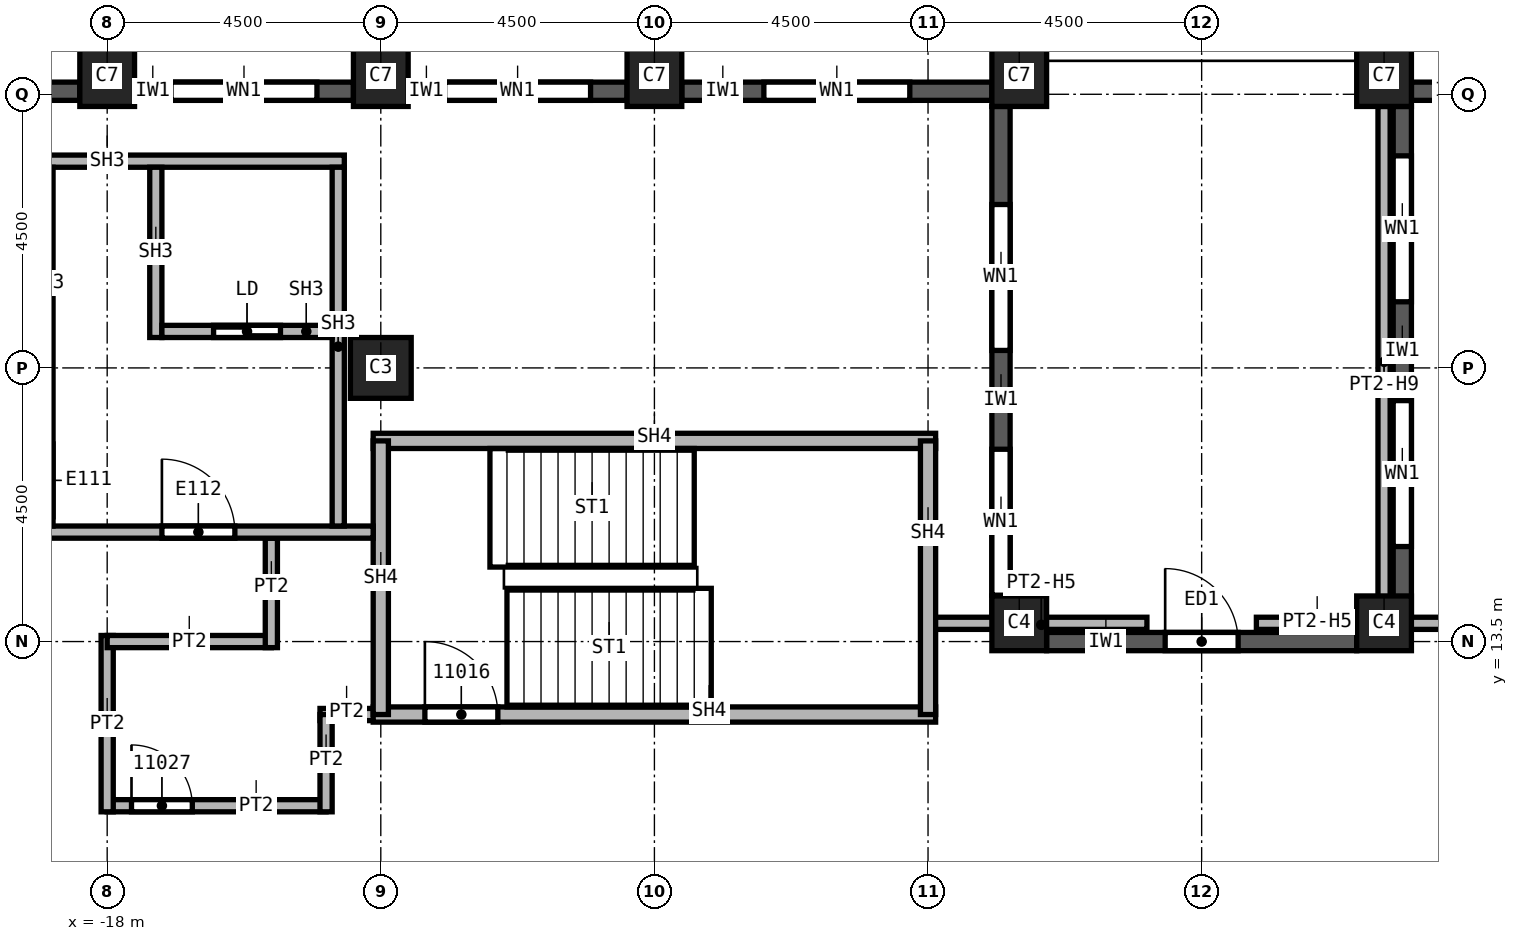
"""IFC4 building model, lengths in metres.
Left out: names, types, materials, properties, quantities, classifications, styles, units other than length and angle.
Written with IfcOpenShell. Run it as: python <this file> out.ifc"""

import sys

from ifc_helpers import new_model, si_unit, direction, frame, frame_2d, origin, origin_2d, place, context, subcontext, project, spatial, rectangle, extrude, element, fill, save


model = new_model("IFC4")
c1 = context("Model", 3, precision=1e-05, world=origin(), true_north=direction((0.0, 1.0)))
c2 = subcontext(c1, "Body", "Model", "MODEL_VIEW")
j1 = project(units=[si_unit("LENGTHUNIT", "METRE"), si_unit("PLANEANGLEUNIT", "RADIAN")], contexts=[c1])
p1 = place(None, origin())
s1 = spatial("IfcSite", under=j1, at=p1, CompositionType="ELEMENT")
p2 = place(p1, origin())
s2 = spatial("IfcBuilding", under=s1, at=p2, CompositionType="ELEMENT")
p3 = place(p2, frame((0.0, 0.0, 184.0)))
s3 = spatial("IfcBuildingStorey", under=s2, at=p3, CompositionType="ELEMENT", Elevation=184.0)
p4 = place(p3, frame((-13.5, 18.0, 0.0), z_axis=(0.0, 0.0, 1.0), x_axis=(1.0, 0.0, 0.0)))
e1 = element("IfcColumn", 1, at=p4, inside=s3, PredefinedType="COLUMN", context=c2, shape_type="SweptSolid", body=[
    extrude(rectangle(XDim=1.0, YDim=1.0, at=origin_2d()), origin(), (0.0, 0.0, 1.0), 3.72),
])
for number, where, z_axis, x_axis in (
    (2, (3.0, 22.8, 0.0), (0.0, 0.0, 1.0), (1.0, 0.0, 0.0)),
    (3, (-3.0, 22.8, 0.0), (0.0, 0.0, 1.0), (1.0, 0.0, 0.0)),
    (4, (-9.0, 22.8, 0.0), (0.0, 0.0, 1.0), (1.0, 0.0, 0.0)),
    (5, (-13.5, 22.8, 0.0), (0.0, 0.0, 1.0), (1.0, 0.0, 0.0)),
    (6, (-18.0, 22.8, 0.0), (0.0, 0.0, 1.0), (1.0, 0.0, 0.0)),
):
    element("IfcColumn", number, at=place(p3, frame(where, z_axis=z_axis, x_axis=x_axis)), inside=s3, PredefinedType="COLUMN", context=c2, shape_type="SweptSolid", body=[
        extrude(rectangle(XDim=0.9, YDim=1.0, at=origin_2d()), origin(), (0.0, 0.0, 1.0), 3.72),
    ])
for number, where, z_axis, x_axis in (
    (7, (3.0, 13.8, 0.0), (0.0, 0.0, 1.0), (1.0, 0.0, 0.0)),
    (8, (-3.0, 13.8, 0.0), (0.0, 0.0, 1.0), (1.0, 0.0, 0.0)),
):
    element("IfcColumn", number, at=place(p3, frame(where, z_axis=z_axis, x_axis=x_axis)), inside=s3, PredefinedType="COLUMN", context=c2, shape_type="SweptSolid", body=[
        extrude(rectangle(XDim=0.9, YDim=0.9, at=origin_2d()), origin(), (0.0, 0.0, 1.0), 3.72),
    ])
p5 = place(p3, frame((8.55, 22.55, 0.0), z_axis=(0.0, 0.0, 1.0), x_axis=(-1.0, 0.0, 0.0)))
e9 = element("IfcWall", 9, at=p5, inside=s3, PredefinedType="SOLIDWALL", context=c2, shape_type="SweptSolid", body=[
    extrude(rectangle(XDim=5.1, YDim=0.3, at=frame_2d((2.55, 0.0))), origin(), (0.0, 0.0, 1.0), 3.12),
])
p6 = place(p5, frame((1.35, 0.0, 0.8)))
e10 = element("IfcOpeningElement", 10, at=p6, cuts=e9, PredefinedType="OPENING", context=c2, shape_type="SweptSolid", body=[
    extrude(rectangle(XDim=2.4, YDim=1.95, at=frame_2d((1.2, 0.975))), frame((0.0, 0.15, 0.0), z_axis=(0.0, -1.0, 0.0), x_axis=(1.0, 0.0, 0.0)), (0.0, 0.0, 1.0), 0.3),
])
p7 = place(p3, frame((3.3, 22.3, 0.0), z_axis=(0.0, 0.0, 1.0), x_axis=(0.0, -1.0, 0.0)))
e11 = element("IfcWall", 11, at=p7, inside=s3, PredefinedType="SOLIDWALL", context=c2, shape_type="SweptSolid", body=[
    extrude(rectangle(XDim=8.45, YDim=0.3, at=frame_2d((4.225, 0.0))), origin(), (0.0, 0.0, 1.0), 3.12),
])
p8 = place(p7, frame((0.812, 0.0, 0.8)))
e12 = element("IfcOpeningElement", 12, at=p8, cuts=e11, PredefinedType="OPENING", context=c2, shape_type="SweptSolid", body=[
    extrude(rectangle(XDim=2.4, YDim=1.95, at=frame_2d((1.2, 0.975))), frame((0.0, 0.15, 0.0), z_axis=(0.0, -1.0, 0.0), x_axis=(1.0, 0.0, 0.0)), (0.0, 0.0, 1.0), 0.3),
])
p9 = place(p7, frame((4.837, 0.0, 0.8)))
e13 = element("IfcOpeningElement", 13, at=p9, cuts=e11, PredefinedType="OPENING", context=c2, shape_type="SweptSolid", body=[
    extrude(rectangle(XDim=2.4, YDim=1.95, at=frame_2d((1.2, 0.975))), frame((0.0, 0.15, 0.0), z_axis=(0.0, -1.0, 0.0), x_axis=(1.0, 0.0, 0.0)), (0.0, 0.0, 1.0), 0.3),
])
p10 = place(p3, frame((-2.55, 13.5, 0.0), z_axis=(0.0, 0.0, 1.0), x_axis=(1.0, 0.0, 0.0)))
e14 = element("IfcWall", 14, at=p10, inside=s3, PredefinedType="SOLIDWALL", context=c2, shape_type="SweptSolid", body=[
    extrude(rectangle(XDim=5.1, YDim=0.3, at=frame_2d((2.55, 0.0))), origin(), (0.0, 0.0, 1.0), 3.12),
])
p11 = place(p10, frame((1.95, 0.0, 0.0)))
e15 = element("IfcOpeningElement", 15, at=p11, cuts=e14, PredefinedType="OPENING", context=c2, shape_type="SweptSolid", body=[
    extrude(rectangle(XDim=1.2, YDim=2.4, at=frame_2d((0.6, 1.2))), frame((0.0, 0.15, 0.0), z_axis=(0.0, -1.0, 0.0), x_axis=(1.0, 0.0, 0.0)), (0.0, 0.0, 1.0), 0.3),
])
p12 = place(p3, frame((-3.3, 13.85, 0.0), z_axis=(0.0, 0.0, 1.0), x_axis=(0.0, 1.0, 0.0)))
e16 = element("IfcWall", 16, at=p12, inside=s3, PredefinedType="SOLIDWALL", context=c2, shape_type="SweptSolid", body=[
    extrude(rectangle(XDim=8.45, YDim=0.3, at=frame_2d((4.225, 0.0))), origin(), (0.0, 0.0, 1.0), 3.12),
])
p13 = place(p12, frame((0.413, 0.0, 0.8)))
e17 = element("IfcOpeningElement", 17, at=p13, cuts=e16, PredefinedType="OPENING", context=c2, shape_type="SweptSolid", body=[
    extrude(rectangle(XDim=2.4, YDim=1.95, at=frame_2d((1.2, 0.975))), frame((0.0, 0.15, 0.0), z_axis=(0.0, -1.0, 0.0), x_axis=(1.0, 0.0, 0.0)), (0.0, 0.0, 1.0), 0.3),
])
p14 = place(p12, frame((4.438, 0.0, 0.8)))
e18 = element("IfcOpeningElement", 18, at=p14, cuts=e16, PredefinedType="OPENING", context=c2, shape_type="SweptSolid", body=[
    extrude(rectangle(XDim=2.4, YDim=1.95, at=frame_2d((1.2, 0.975))), frame((0.0, 0.15, 0.0), z_axis=(0.0, -1.0, 0.0), x_axis=(1.0, 0.0, 0.0)), (0.0, 0.0, 1.0), 0.3),
])
p15 = place(p3, frame((-3.45, 22.55, 0.0), z_axis=(0.0, 0.0, 1.0), x_axis=(-1.0, 0.0, 0.0)))
e19 = element("IfcWall", 19, at=p15, inside=s3, PredefinedType="SOLIDWALL", context=c2, shape_type="SweptSolid", body=[
    extrude(rectangle(XDim=5.1, YDim=0.3, at=frame_2d((2.55, 0.0))), origin(), (0.0, 0.0, 1.0), 3.12),
])
p16 = place(p15, frame((1.35, 0.0, 0.8)))
e20 = element("IfcOpeningElement", 20, at=p16, cuts=e19, PredefinedType="OPENING", context=c2, shape_type="SweptSolid", body=[
    extrude(rectangle(XDim=2.4, YDim=1.95, at=frame_2d((1.2, 0.975))), frame((0.0, 0.15, 0.0), z_axis=(0.0, -1.0, 0.0), x_axis=(1.0, 0.0, 0.0)), (0.0, 0.0, 1.0), 0.3),
])
p17 = place(p3, frame((-9.45, 22.55, 0.0), z_axis=(0.0, 0.0, 1.0), x_axis=(-1.0, 0.0, 0.0)))
e21 = element("IfcWall", 21, at=p17, inside=s3, PredefinedType="SOLIDWALL", context=c2, shape_type="SweptSolid", body=[
    extrude(rectangle(XDim=3.6, YDim=0.3, at=frame_2d((1.8, 0.0))), origin(), (0.0, 0.0, 1.0), 3.12),
])
p18 = place(p17, frame((0.6, 0.0, 0.8)))
e22 = element("IfcOpeningElement", 22, at=p18, cuts=e21, PredefinedType="OPENING", context=c2, shape_type="SweptSolid", body=[
    extrude(rectangle(XDim=2.4, YDim=1.95, at=frame_2d((1.2, 0.975))), frame((0.0, 0.15, 0.0), z_axis=(0.0, -1.0, 0.0), x_axis=(1.0, 0.0, 0.0)), (0.0, 0.0, 1.0), 0.3),
])
p19 = place(p3, frame((-13.95, 22.55, 0.0), z_axis=(0.0, 0.0, 1.0), x_axis=(-1.0, 0.0, 0.0)))
e23 = element("IfcWall", 23, at=p19, inside=s3, PredefinedType="SOLIDWALL", context=c2, shape_type="SweptSolid", body=[
    extrude(rectangle(XDim=3.6, YDim=0.3, at=frame_2d((1.8, 0.0))), origin(), (0.0, 0.0, 1.0), 3.12),
])
p20 = place(p19, frame((0.6, 0.0, 0.8)))
e24 = element("IfcOpeningElement", 24, at=p20, cuts=e23, PredefinedType="OPENING", context=c2, shape_type="SweptSolid", body=[
    extrude(rectangle(XDim=2.4, YDim=1.95, at=frame_2d((1.2, 0.975))), frame((0.0, 0.15, 0.0), z_axis=(0.0, -1.0, 0.0), x_axis=(1.0, 0.0, 0.0)), (0.0, 0.0, 1.0), 0.3),
])
p21 = place(p3, frame((-18.45, 22.55, 0.0), z_axis=(0.0, 0.0, 1.0), x_axis=(-1.0, 0.0, 0.0)))
e25 = element("IfcWall", 25, at=p21, inside=s3, PredefinedType="SOLIDWALL", context=c2, shape_type="SweptSolid", body=[
    extrude(rectangle(XDim=3.6, YDim=0.3, at=frame_2d((1.8, 0.0))), origin(), (0.0, 0.0, 1.0), 3.12),
])
p22 = place(p21, frame((0.6, 0.0, 0.8)))
e26 = element("IfcOpeningElement", 26, at=p22, cuts=e25, PredefinedType="OPENING", context=c2, shape_type="SweptSolid", body=[
    extrude(rectangle(XDim=2.4, YDim=1.95, at=frame_2d((1.2, 0.975))), frame((0.0, 0.15, 0.0), z_axis=(0.0, -1.0, 0.0), x_axis=(1.0, 0.0, 0.0)), (0.0, 0.0, 1.0), 0.3),
])
p23 = place(p3, frame((-18.0, 10.8, 0.0), z_axis=(0.0, 0.0, 1.0), x_axis=(1.0, 0.0, 0.0)))
e27 = element("IfcWall", 27, at=p23, inside=s3, PredefinedType="PARTITIONING", context=c2, shape_type="SweptSolid", body=[
    extrude(rectangle(XDim=3.6, YDim=0.2, at=frame_2d((1.8, 0.0))), origin(), (0.0, 0.0, 1.0), 3.72),
])
p24 = place(p23, frame((0.4, 0.0, 0.0)))
e28 = element("IfcOpeningElement", 28, at=p24, cuts=e27, PredefinedType="OPENING", context=c2, shape_type="SweptSolid", body=[
    extrude(rectangle(XDim=1.0, YDim=2.1, at=frame_2d((0.5, 1.05))), frame((0.0, 0.1, 0.0), z_axis=(0.0, -1.0, 0.0), x_axis=(1.0, 0.0, 0.0)), (0.0, 0.0, 1.0), 0.2),
])
p25 = place(p3, frame((-18.0, 13.6, 0.0), z_axis=(0.0, 0.0, 1.0), x_axis=(0.0, -1.0, 0.0)))
e29 = element("IfcWall", 29, at=p25, inside=s3, PredefinedType="PARTITIONING", context=c2, shape_type="SweptSolid", body=[
    extrude(rectangle(XDim=2.9, YDim=0.2, at=frame_2d((1.45, 0.0))), origin(), (0.0, 0.0, 1.0), 3.72),
])
p26 = place(p3, frame((-15.3, 13.5, 0.0), z_axis=(0.0, 0.0, 1.0), x_axis=(-1.0, 0.0, 0.0)))
e30 = element("IfcWall", 30, at=p26, inside=s3, PredefinedType="PARTITIONING", context=c2, shape_type="SweptSolid", body=[
    extrude(rectangle(XDim=2.7, YDim=0.2, at=frame_2d((1.35, 0.0))), origin(), (0.0, 0.0, 1.0), 3.72),
])
p27 = place(p3, frame((-15.3, 15.2, 0.0), z_axis=(0.0, 0.0, 1.0), x_axis=(0.0, -1.0, 0.0)))
e31 = element("IfcWall", 31, at=p27, inside=s3, PredefinedType="PARTITIONING", context=c2, shape_type="SweptSolid", body=[
    extrude(rectangle(XDim=1.8, YDim=0.2, at=frame_2d((0.9, 0.0))), origin(), (0.0, 0.0, 1.0), 3.72),
])
p28 = place(p3, frame((-14.5, 12.3, 0.0), z_axis=(0.0, 0.0, 1.0), x_axis=(1.0, 0.0, 0.0)))
e32 = element("IfcWall", 32, at=p28, inside=s3, PredefinedType="PARTITIONING", context=c2, shape_type="SweptSolid", body=[
    extrude(rectangle(XDim=1.125, YDim=0.2, at=frame_2d((0.562, 0.0))), origin(), (0.0, 0.0, 1.0), 3.72),
])
p29 = place(p3, frame((-14.4, 10.7, 0.0), z_axis=(0.0, 0.0, 1.0), x_axis=(0.0, 1.0, 0.0)))
e33 = element("IfcWall", 33, at=p29, inside=s3, PredefinedType="PARTITIONING", context=c2, shape_type="SweptSolid", body=[
    extrude(rectangle(XDim=1.6, YDim=0.2, at=frame_2d((0.8, 0.0))), origin(), (0.0, 0.0, 1.0), 3.72),
])
for number, where, z_axis, x_axis in (
    (34, (-4.5, 13.8, 0.0), (0.0, 0.0, 1.0), (1.0, 0.0, 0.0)),
    (35, (0.9, 13.8, 0.0), (0.0, 0.0, 1.0), (1.0, 0.0, 0.0)),
):
    element("IfcWall", number, at=place(p3, frame(where, z_axis=z_axis, x_axis=x_axis)), inside=s3, PredefinedType="PARTITIONING", context=c2, shape_type="SweptSolid", body=[
        extrude(rectangle(XDim=3.6, YDim=0.2, at=frame_2d((1.8, 0.0))), origin(), (0.0, 0.0, 1.0), 3.113),
    ])
p30 = place(p3, frame((3.0, 22.3, 0.0), z_axis=(0.0, 0.0, 1.0), x_axis=(0.0, -1.0, 0.0)))
e36 = element("IfcWall", 36, at=p30, inside=s3, PredefinedType="PARTITIONING", context=c2, shape_type="SweptSolid", body=[
    extrude(rectangle(XDim=8.5, YDim=0.2, at=frame_2d((4.25, 0.0))), origin(), (0.0, 0.0, 1.0), 2.874),
])
p31 = place(p3, frame((-13.625, 12.3, 0.0), z_axis=(0.0, 0.0, 1.0), x_axis=(1.0, 0.0, 0.0)))
e37 = element("IfcWall", 37, at=p31, inside=s3, PredefinedType="SOLIDWALL", context=c2, shape_type="SweptSolid", body=[
    extrude(rectangle(XDim=9.25, YDim=0.25, at=frame_2d((4.625, 0.0))), origin(), (0.0, 0.0, 1.0), 3.72),
])
p32 = place(p31, frame((0.85, 0.0, 0.0)))
e38 = element("IfcOpeningElement", 38, at=p32, cuts=e37, PredefinedType="OPENING", context=c2, shape_type="SweptSolid", body=[
    extrude(rectangle(XDim=1.2, YDim=2.1, at=frame_2d((0.6, 1.05))), frame((0.0, 0.125, 0.0), z_axis=(0.0, -1.0, 0.0), x_axis=(1.0, 0.0, 0.0)), (0.0, 0.0, 1.0), 0.25),
])
p33 = place(p3, frame((-13.625, 16.8, 0.0), z_axis=(0.0, 0.0, 1.0), x_axis=(1.0, 0.0, 0.0)))
e39 = element("IfcWall", 39, at=p33, inside=s3, PredefinedType="SOLIDWALL", context=c2, shape_type="SweptSolid", body=[
    extrude(rectangle(XDim=9.25, YDim=0.25, at=frame_2d((4.625, 0.0))), origin(), (0.0, 0.0, 1.0), 3.72),
])
for number, where, z_axis, x_axis in (
    (40, (-13.5, 12.3, 0.0), (0.0, 0.0, 1.0), (0.0, 1.0, 0.0)),
    (41, (-4.5, 16.8, 0.0), (0.0, 0.0, 1.0), (0.0, -1.0, 0.0)),
):
    element("IfcWall", number, at=place(p3, frame(where, z_axis=z_axis, x_axis=x_axis)), inside=s3, PredefinedType="SOLIDWALL", context=c2, shape_type="SweptSolid", body=[
        extrude(rectangle(XDim=4.5, YDim=0.25, at=frame_2d((2.25, 0.0))), origin(), (0.0, 0.0, 1.0), 3.72),
    ])
p34 = place(p3, frame((-21.9, 15.3, 0.0), z_axis=(0.0, 0.0, 1.0), x_axis=(1.0, 0.0, 0.0)))
e42 = element("IfcWall", 42, at=p34, inside=s3, PredefinedType="SOLIDWALL", context=c2, shape_type="SweptSolid", body=[
    extrude(rectangle(XDim=8.275, YDim=0.2, at=frame_2d((4.137, 0.0))), origin(), (0.0, 0.0, 1.0), 3.72),
])
p35 = place(p34, frame((4.8, 0.0, 0.0)))
e43 = element("IfcOpeningElement", 43, at=p35, cuts=e42, PredefinedType="OPENING", context=c2, shape_type="SweptSolid", body=[
    extrude(rectangle(XDim=1.2, YDim=2.1, at=frame_2d((0.6, 1.05))), frame((0.0, 0.1, 0.0), z_axis=(0.0, -1.0, 0.0), x_axis=(1.0, 0.0, 0.0)), (0.0, 0.0, 1.0), 0.2),
])
p36 = place(p3, frame((-21.9, 21.4, 0.0), z_axis=(0.0, 0.0, 1.0), x_axis=(1.0, 0.0, 0.0)))
e44 = element("IfcWall", 44, at=p36, inside=s3, PredefinedType="SOLIDWALL", context=c2, shape_type="SweptSolid", body=[
    extrude(rectangle(XDim=7.8, YDim=0.2, at=frame_2d((3.9, 0.0))), origin(), (0.0, 0.0, 1.0), 3.72),
])
p37 = place(p3, frame((-14.2, 15.4, 0.0), z_axis=(0.0, 0.0, 1.0), x_axis=(0.0, 1.0, 0.0)))
e45 = element("IfcWall", 45, at=p37, inside=s3, PredefinedType="SOLIDWALL", context=c2, shape_type="SweptSolid", body=[
    extrude(rectangle(XDim=5.9, YDim=0.2, at=frame_2d((2.95, 0.0))), origin(), (0.0, 0.0, 1.0), 3.72),
])
p38 = place(p3, frame((-18.99, 15.4, 0.0), z_axis=(0.0, 0.0, 1.0), x_axis=(0.0, 1.0, 0.0)))
e46 = element("IfcWall", 46, at=p38, inside=s3, PredefinedType="SOLIDWALL", context=c2, shape_type="SweptSolid", body=[
    extrude(rectangle(XDim=5.9, YDim=0.2, at=frame_2d((2.95, 0.0))), origin(), (0.0, 0.0, 1.0), 3.72),
])
p39 = place(p38, frame((0.15, 0.0, 0.0)))
e47 = element("IfcOpeningElement", 47, at=p39, cuts=e46, PredefinedType="OPENING", context=c2, shape_type="SweptSolid", body=[
    extrude(rectangle(XDim=1.2, YDim=2.1, at=frame_2d((0.6, 1.05))), frame((0.0, 0.1, 0.0), z_axis=(0.0, -1.0, 0.0), x_axis=(1.0, 0.0, 0.0)), (0.0, 0.0, 1.0), 0.2),
])
p40 = place(p3, frame((-17.2, 18.5, 0.0), z_axis=(0.0, 0.0, 1.0), x_axis=(0.0, 1.0, 0.0)))
e48 = element("IfcWall", 48, at=p40, inside=s3, PredefinedType="SOLIDWALL", context=c2, shape_type="SweptSolid", body=[
    extrude(rectangle(XDim=2.8, YDim=0.2, at=frame_2d((1.4, 0.0))), origin(), (0.0, 0.0, 1.0), 3.72),
])
p41 = place(p3, frame((-17.1, 18.6, 0.0), z_axis=(0.0, 0.0, 1.0), x_axis=(1.0, 0.0, 0.0)))
e49 = element("IfcWall", 49, at=p41, inside=s3, PredefinedType="SOLIDWALL", context=c2, shape_type="SweptSolid", body=[
    extrude(rectangle(XDim=2.8, YDim=0.2, at=frame_2d((1.4, 0.0))), origin(), (0.0, 0.0, 1.0), 3.72),
])
p42 = place(p41, frame((0.85, 0.0, 0.0)))
e50 = element("IfcOpeningElement", 50, at=p42, cuts=e49, PredefinedType="OPENING", context=c2, shape_type="SweptSolid", body=[
    extrude(rectangle(XDim=1.1, YDim=2.1, at=frame_2d((0.55, 1.05))), frame((0.0, 0.1, 0.0), z_axis=(0.0, -1.0, 0.0), x_axis=(1.0, 0.0, 0.0)), (0.0, 0.0, 1.0), 0.2),
])
p43 = place(p8, origin())
e51 = element("IfcWindow", 51, at=p43, inside=s3, PartitioningType="SINGLE_PANEL", PredefinedType="WINDOW", context=c2, shape_type="SweptSolid", body=[
    extrude(rectangle(XDim=2.4, YDim=1.95, at=frame_2d((1.2, 0.975))), frame((0.0, 0.03, 0.0), z_axis=(0.0, -1.0, 0.0), x_axis=(1.0, 0.0, 0.0)), (0.0, 0.0, 1.0), 0.06),
])
fill(e12, e51)
p44 = place(p9, origin())
e52 = element("IfcWindow", 52, at=p44, inside=s3, PartitioningType="SINGLE_PANEL", PredefinedType="WINDOW", context=c2, shape_type="SweptSolid", body=[
    extrude(rectangle(XDim=2.4, YDim=1.95, at=frame_2d((1.2, 0.975))), frame((0.0, 0.03, 0.0), z_axis=(0.0, -1.0, 0.0), x_axis=(1.0, 0.0, 0.0)), (0.0, 0.0, 1.0), 0.06),
])
fill(e13, e52)
p45 = place(p11, origin())
e53 = element("IfcDoor", 53, at=p45, inside=s3, OperationType="SINGLE_SWING_LEFT", PredefinedType="DOOR", context=c2, shape_type="SweptSolid", body=[
    extrude(rectangle(XDim=1.2, YDim=2.4, at=frame_2d((0.6, 1.2))), frame((0.0, 0.025, 0.0), z_axis=(0.0, -1.0, 0.0), x_axis=(1.0, 0.0, 0.0)), (0.0, 0.0, 1.0), 0.05),
])
fill(e15, e53)
p46 = place(p13, origin())
e54 = element("IfcWindow", 54, at=p46, inside=s3, PartitioningType="SINGLE_PANEL", PredefinedType="WINDOW", context=c2, shape_type="SweptSolid", body=[
    extrude(rectangle(XDim=2.4, YDim=1.95, at=frame_2d((1.2, 0.975))), frame((0.0, 0.03, 0.0), z_axis=(0.0, -1.0, 0.0), x_axis=(1.0, 0.0, 0.0)), (0.0, 0.0, 1.0), 0.06),
])
fill(e17, e54)
p47 = place(p14, origin())
e55 = element("IfcWindow", 55, at=p47, inside=s3, PartitioningType="SINGLE_PANEL", PredefinedType="WINDOW", context=c2, shape_type="SweptSolid", body=[
    extrude(rectangle(XDim=2.4, YDim=1.95, at=frame_2d((1.2, 0.975))), frame((0.0, 0.03, 0.0), z_axis=(0.0, -1.0, 0.0), x_axis=(1.0, 0.0, 0.0)), (0.0, 0.0, 1.0), 0.06),
])
fill(e18, e55)
p48 = place(p16, origin())
e56 = element("IfcWindow", 56, at=p48, inside=s3, PartitioningType="SINGLE_PANEL", PredefinedType="WINDOW", context=c2, shape_type="SweptSolid", body=[
    extrude(rectangle(XDim=2.4, YDim=1.95, at=frame_2d((1.2, 0.975))), frame((0.0, 0.03, 0.0), z_axis=(0.0, -1.0, 0.0), x_axis=(1.0, 0.0, 0.0)), (0.0, 0.0, 1.0), 0.06),
])
fill(e20, e56)
p49 = place(p18, origin())
e57 = element("IfcWindow", 57, at=p49, inside=s3, PartitioningType="SINGLE_PANEL", PredefinedType="WINDOW", context=c2, shape_type="SweptSolid", body=[
    extrude(rectangle(XDim=2.4, YDim=1.95, at=frame_2d((1.2, 0.975))), frame((0.0, 0.03, 0.0), z_axis=(0.0, -1.0, 0.0), x_axis=(1.0, 0.0, 0.0)), (0.0, 0.0, 1.0), 0.06),
])
fill(e22, e57)
p50 = place(p20, origin())
e58 = element("IfcWindow", 58, at=p50, inside=s3, PartitioningType="SINGLE_PANEL", PredefinedType="WINDOW", context=c2, shape_type="SweptSolid", body=[
    extrude(rectangle(XDim=2.4, YDim=1.95, at=frame_2d((1.2, 0.975))), frame((0.0, 0.03, 0.0), z_axis=(0.0, -1.0, 0.0), x_axis=(1.0, 0.0, 0.0)), (0.0, 0.0, 1.0), 0.06),
])
fill(e24, e58)
p51 = place(p32, origin())
e59 = element("IfcDoor", 59, at=p51, inside=s3, OperationType="SINGLE_SWING_LEFT", PredefinedType="DOOR", context=c2, shape_type="SweptSolid", body=[
    extrude(rectangle(XDim=1.2, YDim=2.1, at=frame_2d((0.6, 1.05))), frame((0.0, 0.025, 0.0), z_axis=(0.0, -1.0, 0.0), x_axis=(1.0, 0.0, 0.0)), (0.0, 0.0, 1.0), 0.05),
])
fill(e38, e59)
p52 = place(p24, origin())
e60 = element("IfcDoor", 60, at=p52, inside=s3, OperationType="SINGLE_SWING_RIGHT", PredefinedType="DOOR", context=c2, shape_type="SweptSolid", body=[
    extrude(rectangle(XDim=1.0, YDim=2.1, at=frame_2d((0.5, 1.05))), frame((0.0, 0.025, 0.0), z_axis=(0.0, -1.0, 0.0), x_axis=(1.0, 0.0, 0.0)), (0.0, 0.0, 1.0), 0.05),
])
fill(e28, e60)
p53 = place(p42, origin())
e61 = element("IfcDoor", 61, at=p53, inside=s3, OperationType="SLIDING_TO_LEFT", PredefinedType="DOOR", context=c2, shape_type="SweptSolid", body=[
    extrude(rectangle(XDim=1.1, YDim=2.1, at=frame_2d((0.55, 1.05))), frame((0.0, 0.025, 0.0), z_axis=(0.0, -1.0, 0.0), x_axis=(1.0, 0.0, 0.0)), (0.0, 0.0, 1.0), 0.05),
])
fill(e50, e61)
p54 = place(p35, origin())
e62 = element("IfcDoor", 62, at=p54, inside=s3, OperationType="SINGLE_SWING_RIGHT", PredefinedType="DOOR", context=c2, shape_type="SweptSolid", body=[
    extrude(rectangle(XDim=1.2, YDim=2.1, at=frame_2d((0.6, 1.05))), frame((0.0, 0.025, 0.0), z_axis=(0.0, -1.0, 0.0), x_axis=(1.0, 0.0, 0.0)), (0.0, 0.0, 1.0), 0.05),
])
fill(e43, e62)
save(model, sys.argv[1])
